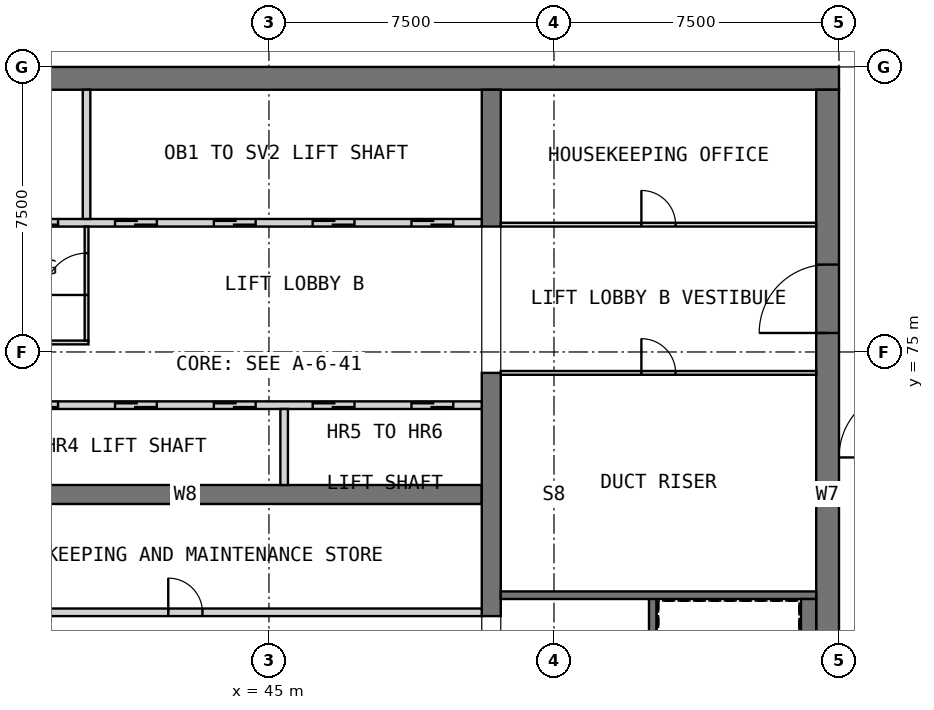
"""IFC4 building model, lengths in metres.
Left out: names, types, materials, properties, quantities, classifications, styles, units other than length and angle.
Written with IfcOpenShell. Run it as: python <this file> out.ifc"""

import sys

from ifc_helpers import new_model, si_unit, direction, frame, frame_2d, origin, place, context, subcontext, project, spatial, rectangle, extrude, element, fill, save


model = new_model("IFC4")
c1 = context("Model", 3, precision=1e-05, world=origin(), true_north=direction((0.0, 1.0)))
c2 = subcontext(c1, "Body", "Model", "MODEL_VIEW")
j1 = project(units=[si_unit("LENGTHUNIT", "METRE"), si_unit("PLANEANGLEUNIT", "RADIAN")], contexts=[c1])
p1 = place(None, origin())
s1 = spatial("IfcSite", under=j1, at=p1, CompositionType="ELEMENT")
p2 = place(p1, origin())
s2 = spatial("IfcBuilding", under=s1, at=p2, CompositionType="ELEMENT")
p3 = place(p2, frame((0.0, 0.0, 302.7)))
s3 = spatial("IfcBuildingStorey", under=s2, at=p3, CompositionType="ELEMENT", Elevation=302.7)
p4 = place(p3, frame((30.0, 82.2, 0.0), z_axis=(0.0, 0.0, 1.0), x_axis=(1.0, 0.0, 0.0)))
e1 = element("IfcWall", 1, at=p4, inside=s3, PredefinedType="SHEAR", context=c2, shape_type="SweptSolid", body=[
    extrude(rectangle(XDim=30.0, YDim=0.6, at=frame_2d((15.0, 0.0))), origin(), (0.0, 0.0, 1.0), 6.0),
])
p5 = place(p3, frame((59.7, 60.6, 0.0), z_axis=(0.0, 0.0, 1.0), x_axis=(0.0, 1.0, 0.0)))
e2 = element("IfcWall", 2, at=p5, inside=s3, PredefinedType="SHEAR", context=c2, shape_type="SweptSolid", body=[
    extrude(rectangle(XDim=21.3, YDim=0.6, at=frame_2d((10.65, 0.0))), origin(), (0.0, 0.0, 1.0), 6.0),
])
p6 = place(p5, frame((14.9, 0.0, 0.0)))
e3 = element("IfcOpeningElement", 3, at=p6, cuts=e2, PredefinedType="OPENING", context=c2, shape_type="SweptSolid", body=[
    extrude(rectangle(XDim=1.8, YDim=2.1, at=frame_2d((0.9, 1.05))), frame((0.0, 0.31, 0.0), z_axis=(0.0, -1.0, 0.0), x_axis=(1.0, 0.0, 0.0)), (0.0, 0.0, 1.0), 0.62),
])
p7 = place(p3, frame((35.0, 71.25, 0.0), z_axis=(0.0, 0.0, 1.0), x_axis=(1.0, 0.0, 0.0)))
e4 = element("IfcWall", 4, at=p7, inside=s3, PredefinedType="SHEAR", context=c2, shape_type="SweptSolid", body=[
    extrude(rectangle(XDim=15.6, YDim=0.5, at=frame_2d((7.8, 0.0))), origin(), (0.0, 0.0, 1.0), 6.0),
])
p8 = place(p3, frame((50.85, 68.05, 0.0), z_axis=(0.0, 0.0, 1.0), x_axis=(0.0, 1.0, 0.0)))
e5 = element("IfcWall", 5, at=p8, inside=s3, PredefinedType="SHEAR", context=c2, shape_type="SweptSolid", body=[
    extrude(rectangle(XDim=6.4, YDim=0.5, at=frame_2d((3.2, 0.0))), origin(), (0.0, 0.0, 1.0), 6.0),
])
p9 = place(p3, frame((50.85, 78.3, 0.0), z_axis=(0.0, 0.0, 1.0), x_axis=(0.0, 1.0, 0.0)))
e6 = element("IfcWall", 6, at=p9, inside=s3, PredefinedType="SHEAR", context=c2, shape_type="SweptSolid", body=[
    extrude(rectangle(XDim=3.6, YDim=0.5, at=frame_2d((1.8, 0.0))), origin(), (0.0, 0.0, 1.0), 6.0),
])
p10 = place(p3, frame((35.0, 68.15, 0.0), z_axis=(0.0, 0.0, 1.0), x_axis=(1.0, 0.0, 0.0)))
e7 = element("IfcWall", 7, at=p10, inside=s3, PredefinedType="PARTITIONING", context=c2, shape_type="SweptSolid", body=[
    extrude(rectangle(XDim=15.6, YDim=0.2, at=frame_2d((7.8, 0.0))), origin(), (0.0, 0.0, 1.0), 5.7),
])
p11 = place(p10, frame((7.35, 0.0, 0.0)))
e8 = element("IfcOpeningElement", 8, at=p11, cuts=e7, PredefinedType="OPENING", context=c2, shape_type="SweptSolid", body=[
    extrude(rectangle(XDim=0.9, YDim=2.1, at=frame_2d((0.45, 1.05))), frame((0.0, 0.11, 0.0), z_axis=(0.0, -1.0, 0.0), x_axis=(1.0, 0.0, 0.0)), (0.0, 0.0, 1.0), 0.22),
])
p12 = place(p3, frame((35.0, 73.6, 0.0), z_axis=(0.0, 0.0, 1.0), x_axis=(1.0, 0.0, 0.0)))
e9 = element("IfcWall", 9, at=p12, inside=s3, PredefinedType="SOLIDWALL", context=c2, shape_type="SweptSolid", body=[
    extrude(rectangle(XDim=15.6, YDim=0.2, at=frame_2d((7.8, 0.0))), origin(), (0.0, 0.0, 1.0), 6.0),
])
p13 = place(p12, frame((0.75, 0.0, 0.0)))
e10 = element("IfcOpeningElement", 10, at=p13, cuts=e9, PredefinedType="OPENING", context=c2, shape_type="SweptSolid", body=[
    extrude(rectangle(XDim=1.1, YDim=2.1, at=frame_2d((0.55, 1.05))), frame((0.0, 0.11, 0.0), z_axis=(0.0, -1.0, 0.0), x_axis=(1.0, 0.0, 0.0)), (0.0, 0.0, 1.0), 0.22),
])
p14 = place(p12, frame((3.35, 0.0, 0.0)))
e11 = element("IfcOpeningElement", 11, at=p14, cuts=e9, PredefinedType="OPENING", context=c2, shape_type="SweptSolid", body=[
    extrude(rectangle(XDim=1.1, YDim=2.1, at=frame_2d((0.55, 1.05))), frame((0.0, 0.11, 0.0), z_axis=(0.0, -1.0, 0.0), x_axis=(1.0, 0.0, 0.0)), (0.0, 0.0, 1.0), 0.22),
])
p15 = place(p12, frame((5.95, 0.0, 0.0)))
e12 = element("IfcOpeningElement", 12, at=p15, cuts=e9, PredefinedType="OPENING", context=c2, shape_type="SweptSolid", body=[
    extrude(rectangle(XDim=1.1, YDim=2.1, at=frame_2d((0.55, 1.05))), frame((0.0, 0.11, 0.0), z_axis=(0.0, -1.0, 0.0), x_axis=(1.0, 0.0, 0.0)), (0.0, 0.0, 1.0), 0.22),
])
p16 = place(p12, frame((8.55, 0.0, 0.0)))
e13 = element("IfcOpeningElement", 13, at=p16, cuts=e9, PredefinedType="OPENING", context=c2, shape_type="SweptSolid", body=[
    extrude(rectangle(XDim=1.1, YDim=2.1, at=frame_2d((0.55, 1.05))), frame((0.0, 0.11, 0.0), z_axis=(0.0, -1.0, 0.0), x_axis=(1.0, 0.0, 0.0)), (0.0, 0.0, 1.0), 0.22),
])
p17 = place(p12, frame((11.15, 0.0, 0.0)))
e14 = element("IfcOpeningElement", 14, at=p17, cuts=e9, PredefinedType="OPENING", context=c2, shape_type="SweptSolid", body=[
    extrude(rectangle(XDim=1.1, YDim=2.1, at=frame_2d((0.55, 1.05))), frame((0.0, 0.11, 0.0), z_axis=(0.0, -1.0, 0.0), x_axis=(1.0, 0.0, 0.0)), (0.0, 0.0, 1.0), 0.22),
])
p18 = place(p12, frame((13.75, 0.0, 0.0)))
e15 = element("IfcOpeningElement", 15, at=p18, cuts=e9, PredefinedType="OPENING", context=c2, shape_type="SweptSolid", body=[
    extrude(rectangle(XDim=1.1, YDim=2.1, at=frame_2d((0.55, 1.05))), frame((0.0, 0.11, 0.0), z_axis=(0.0, -1.0, 0.0), x_axis=(1.0, 0.0, 0.0)), (0.0, 0.0, 1.0), 0.22),
])
p19 = place(p3, frame((45.4, 71.5, 0.0), z_axis=(0.0, 0.0, 1.0), x_axis=(0.0, 1.0, 0.0)))
e16 = element("IfcWall", 16, at=p19, inside=s3, PredefinedType="SOLIDWALL", context=c2, shape_type="SweptSolid", body=[
    extrude(rectangle(XDim=2.0, YDim=0.2, at=frame_2d((1.0, 0.0))), origin(), (0.0, 0.0, 1.0), 6.0),
])
p20 = place(p3, frame((35.0, 78.4, 0.0), z_axis=(0.0, 0.0, 1.0), x_axis=(1.0, 0.0, 0.0)))
e17 = element("IfcWall", 17, at=p20, inside=s3, PredefinedType="SOLIDWALL", context=c2, shape_type="SweptSolid", body=[
    extrude(rectangle(XDim=15.6, YDim=0.2, at=frame_2d((7.8, 0.0))), origin(), (0.0, 0.0, 1.0), 6.0),
])
p21 = place(p20, frame((0.75, 0.0, 0.0)))
e18 = element("IfcOpeningElement", 18, at=p21, cuts=e17, PredefinedType="OPENING", context=c2, shape_type="SweptSolid", body=[
    extrude(rectangle(XDim=1.1, YDim=2.1, at=frame_2d((0.55, 1.05))), frame((0.0, 0.11, 0.0), z_axis=(0.0, -1.0, 0.0), x_axis=(1.0, 0.0, 0.0)), (0.0, 0.0, 1.0), 0.22),
])
p22 = place(p20, frame((3.35, 0.0, 0.0)))
e19 = element("IfcOpeningElement", 19, at=p22, cuts=e17, PredefinedType="OPENING", context=c2, shape_type="SweptSolid", body=[
    extrude(rectangle(XDim=1.1, YDim=2.1, at=frame_2d((0.55, 1.05))), frame((0.0, 0.11, 0.0), z_axis=(0.0, -1.0, 0.0), x_axis=(1.0, 0.0, 0.0)), (0.0, 0.0, 1.0), 0.22),
])
p23 = place(p20, frame((5.95, 0.0, 0.0)))
e20 = element("IfcOpeningElement", 20, at=p23, cuts=e17, PredefinedType="OPENING", context=c2, shape_type="SweptSolid", body=[
    extrude(rectangle(XDim=1.1, YDim=2.1, at=frame_2d((0.55, 1.05))), frame((0.0, 0.11, 0.0), z_axis=(0.0, -1.0, 0.0), x_axis=(1.0, 0.0, 0.0)), (0.0, 0.0, 1.0), 0.22),
])
p24 = place(p20, frame((8.55, 0.0, 0.0)))
e21 = element("IfcOpeningElement", 21, at=p24, cuts=e17, PredefinedType="OPENING", context=c2, shape_type="SweptSolid", body=[
    extrude(rectangle(XDim=1.1, YDim=2.1, at=frame_2d((0.55, 1.05))), frame((0.0, 0.11, 0.0), z_axis=(0.0, -1.0, 0.0), x_axis=(1.0, 0.0, 0.0)), (0.0, 0.0, 1.0), 0.22),
])
p25 = place(p20, frame((11.15, 0.0, 0.0)))
e22 = element("IfcOpeningElement", 22, at=p25, cuts=e17, PredefinedType="OPENING", context=c2, shape_type="SweptSolid", body=[
    extrude(rectangle(XDim=1.1, YDim=2.1, at=frame_2d((0.55, 1.05))), frame((0.0, 0.11, 0.0), z_axis=(0.0, -1.0, 0.0), x_axis=(1.0, 0.0, 0.0)), (0.0, 0.0, 1.0), 0.22),
])
p26 = place(p20, frame((13.75, 0.0, 0.0)))
e23 = element("IfcOpeningElement", 23, at=p26, cuts=e17, PredefinedType="OPENING", context=c2, shape_type="SweptSolid", body=[
    extrude(rectangle(XDim=1.1, YDim=2.1, at=frame_2d((0.55, 1.05))), frame((0.0, 0.11, 0.0), z_axis=(0.0, -1.0, 0.0), x_axis=(1.0, 0.0, 0.0)), (0.0, 0.0, 1.0), 0.22),
])
p27 = place(p3, frame((40.2, 78.5, 0.0), z_axis=(0.0, 0.0, 1.0), x_axis=(0.0, 1.0, 0.0)))
e24 = element("IfcWall", 24, at=p27, inside=s3, PredefinedType="SOLIDWALL", context=c2, shape_type="SweptSolid", body=[
    extrude(rectangle(XDim=3.4, YDim=0.2, at=frame_2d((1.7, 0.0))), origin(), (0.0, 0.0, 1.0), 6.0),
])
p28 = place(p3, frame((35.0, 75.25, 0.0), z_axis=(0.0, 0.0, 1.0), x_axis=(1.0, 0.0, 0.0)))
e25 = element("IfcWall", 25, at=p28, inside=s3, PredefinedType="PARTITIONING", context=c2, shape_type="SweptSolid", body=[
    extrude(rectangle(XDim=5.25, YDim=0.1, at=frame_2d((2.625, 0.0))), origin(), (0.0, 0.0, 1.0), 5.7),
])
p29 = place(p3, frame((40.2, 75.3, 0.0), z_axis=(0.0, 0.0, 1.0), x_axis=(0.0, 1.0, 0.0)))
e26 = element("IfcWall", 26, at=p29, inside=s3, PredefinedType="PARTITIONING", context=c2, shape_type="SweptSolid", body=[
    extrude(rectangle(XDim=3.0, YDim=0.1, at=frame_2d((1.5, 0.0))), origin(), (0.0, 0.0, 1.0), 5.7),
])
p30 = place(p29, frame((1.2, 0.0, 0.0)))
e27 = element("IfcOpeningElement", 27, at=p30, cuts=e26, PredefinedType="OPENING", context=c2, shape_type="SweptSolid", body=[
    extrude(rectangle(XDim=1.1, YDim=2.1, at=frame_2d((0.55, 1.05))), frame((0.0, 0.06, 0.0), z_axis=(0.0, -1.0, 0.0), x_axis=(1.0, 0.0, 0.0)), (0.0, 0.0, 1.0), 0.12),
])
p31 = place(p3, frame((55.1, 60.6, 0.0), z_axis=(0.0, 0.0, 1.0), x_axis=(0.0, 1.0, 0.0)))
e28 = element("IfcWall", 28, at=p31, inside=s3, PredefinedType="SOLIDWALL", context=c2, shape_type="SweptSolid", body=[
    extrude(rectangle(XDim=8.0, YDim=0.2, at=frame_2d((4.0, 0.0))), origin(), (0.0, 0.0, 1.0), 5.7),
])
p32 = place(p3, frame((51.1, 68.6, 0.0), z_axis=(0.0, 0.0, 1.0), x_axis=(1.0, 0.0, 0.0)))
e29 = element("IfcWall", 29, at=p32, inside=s3, PredefinedType="SOLIDWALL", context=c2, shape_type="SweptSolid", body=[
    extrude(rectangle(XDim=8.3, YDim=0.2, at=frame_2d((4.15, 0.0))), origin(), (0.0, 0.0, 1.0), 5.7),
])
p33 = place(p3, frame((59.2, 60.6, 0.0), z_axis=(0.0, 0.0, 1.0), x_axis=(0.0, 1.0, 0.0)))
e30 = element("IfcWall", 30, at=p33, inside=s3, PredefinedType="SOLIDWALL", context=c2, shape_type="SweptSolid", body=[
    extrude(rectangle(XDim=7.9, YDim=0.4, at=frame_2d((3.95, 0.0))), origin(), (0.0, 0.0, 1.0), 5.7),
])
p34 = place(p3, frame((51.1, 74.45, 0.0), z_axis=(0.0, 0.0, 1.0), x_axis=(1.0, 0.0, 0.0)))
e31 = element("IfcWall", 31, at=p34, inside=s3, PredefinedType="PARTITIONING", context=c2, shape_type="SweptSolid", body=[
    extrude(rectangle(XDim=8.3, YDim=0.1, at=frame_2d((4.15, 0.0))), origin(), (0.0, 0.0, 1.0), 5.7),
])
p35 = place(p34, frame((3.7, 0.0, 0.0)))
e32 = element("IfcOpeningElement", 32, at=p35, cuts=e31, PredefinedType="OPENING", context=c2, shape_type="SweptSolid", body=[
    extrude(rectangle(XDim=0.9, YDim=2.1, at=frame_2d((0.45, 1.05))), frame((0.0, 0.06, 0.0), z_axis=(0.0, -1.0, 0.0), x_axis=(1.0, 0.0, 0.0)), (0.0, 0.0, 1.0), 0.12),
])
p36 = place(p3, frame((51.1, 78.35, 0.0), z_axis=(0.0, 0.0, 1.0), x_axis=(1.0, 0.0, 0.0)))
e33 = element("IfcWall", 33, at=p36, inside=s3, PredefinedType="PARTITIONING", context=c2, shape_type="SweptSolid", body=[
    extrude(rectangle(XDim=8.3, YDim=0.1, at=frame_2d((4.15, 0.0))), origin(), (0.0, 0.0, 1.0), 5.7),
])
p37 = place(p36, frame((3.7, 0.0, 0.0)))
e34 = element("IfcOpeningElement", 34, at=p37, cuts=e33, PredefinedType="OPENING", context=c2, shape_type="SweptSolid", body=[
    extrude(rectangle(XDim=0.9, YDim=2.1, at=frame_2d((0.45, 1.05))), frame((0.0, 0.06, 0.0), z_axis=(0.0, -1.0, 0.0), x_axis=(1.0, 0.0, 0.0)), (0.0, 0.0, 1.0), 0.12),
])
p38 = place(p11, origin())
e35 = element("IfcDoor", 35, at=p38, inside=s3, OperationType="SINGLE_SWING_LEFT", PredefinedType="DOOR", context=c2, shape_type="SweptSolid", body=[
    extrude(rectangle(XDim=0.9, YDim=2.1, at=frame_2d((0.45, 1.05))), frame((0.0, 0.025, 0.0), z_axis=(0.0, -1.0, 0.0), x_axis=(1.0, 0.0, 0.0)), (0.0, 0.0, 1.0), 0.05),
])
fill(e8, e35)
p39 = place(p14, origin())
e36 = element("IfcDoor", 36, at=p39, inside=s3, OperationType="DOUBLE_DOOR_SLIDING", PredefinedType="DOOR", context=c2, shape_type="SweptSolid", body=[
    extrude(rectangle(XDim=1.1, YDim=2.1, at=frame_2d((0.55, 1.05))), frame((0.0, 0.025, 0.0), z_axis=(0.0, -1.0, 0.0), x_axis=(1.0, 0.0, 0.0)), (0.0, 0.0, 1.0), 0.05),
])
fill(e11, e36)
p40 = place(p15, origin())
e37 = element("IfcDoor", 37, at=p40, inside=s3, OperationType="DOUBLE_DOOR_SLIDING", PredefinedType="DOOR", context=c2, shape_type="SweptSolid", body=[
    extrude(rectangle(XDim=1.1, YDim=2.1, at=frame_2d((0.55, 1.05))), frame((0.0, 0.025, 0.0), z_axis=(0.0, -1.0, 0.0), x_axis=(1.0, 0.0, 0.0)), (0.0, 0.0, 1.0), 0.05),
])
fill(e12, e37)
p41 = place(p16, origin())
e38 = element("IfcDoor", 38, at=p41, inside=s3, OperationType="DOUBLE_DOOR_SLIDING", PredefinedType="DOOR", context=c2, shape_type="SweptSolid", body=[
    extrude(rectangle(XDim=1.1, YDim=2.1, at=frame_2d((0.55, 1.05))), frame((0.0, 0.025, 0.0), z_axis=(0.0, -1.0, 0.0), x_axis=(1.0, 0.0, 0.0)), (0.0, 0.0, 1.0), 0.05),
])
fill(e13, e38)
p42 = place(p17, origin())
e39 = element("IfcDoor", 39, at=p42, inside=s3, OperationType="DOUBLE_DOOR_SLIDING", PredefinedType="DOOR", context=c2, shape_type="SweptSolid", body=[
    extrude(rectangle(XDim=1.1, YDim=2.1, at=frame_2d((0.55, 1.05))), frame((0.0, 0.025, 0.0), z_axis=(0.0, -1.0, 0.0), x_axis=(1.0, 0.0, 0.0)), (0.0, 0.0, 1.0), 0.05),
])
fill(e14, e39)
p43 = place(p18, origin())
e40 = element("IfcDoor", 40, at=p43, inside=s3, OperationType="DOUBLE_DOOR_SLIDING", PredefinedType="DOOR", context=c2, shape_type="SweptSolid", body=[
    extrude(rectangle(XDim=1.1, YDim=2.1, at=frame_2d((0.55, 1.05))), frame((0.0, 0.025, 0.0), z_axis=(0.0, -1.0, 0.0), x_axis=(1.0, 0.0, 0.0)), (0.0, 0.0, 1.0), 0.05),
])
fill(e15, e40)
p44 = place(p22, origin())
e41 = element("IfcDoor", 41, at=p44, inside=s3, OperationType="DOUBLE_DOOR_SLIDING", PredefinedType="DOOR", context=c2, shape_type="SweptSolid", body=[
    extrude(rectangle(XDim=1.1, YDim=2.1, at=frame_2d((0.55, 1.05))), frame((0.0, 0.025, 0.0), z_axis=(0.0, -1.0, 0.0), x_axis=(1.0, 0.0, 0.0)), (0.0, 0.0, 1.0), 0.05),
])
fill(e19, e41)
p45 = place(p23, origin())
e42 = element("IfcDoor", 42, at=p45, inside=s3, OperationType="DOUBLE_DOOR_SLIDING", PredefinedType="DOOR", context=c2, shape_type="SweptSolid", body=[
    extrude(rectangle(XDim=1.1, YDim=2.1, at=frame_2d((0.55, 1.05))), frame((0.0, 0.025, 0.0), z_axis=(0.0, -1.0, 0.0), x_axis=(1.0, 0.0, 0.0)), (0.0, 0.0, 1.0), 0.05),
])
fill(e20, e42)
p46 = place(p24, origin())
e43 = element("IfcDoor", 43, at=p46, inside=s3, OperationType="DOUBLE_DOOR_SLIDING", PredefinedType="DOOR", context=c2, shape_type="SweptSolid", body=[
    extrude(rectangle(XDim=1.1, YDim=2.1, at=frame_2d((0.55, 1.05))), frame((0.0, 0.025, 0.0), z_axis=(0.0, -1.0, 0.0), x_axis=(1.0, 0.0, 0.0)), (0.0, 0.0, 1.0), 0.05),
])
fill(e21, e43)
p47 = place(p25, origin())
e44 = element("IfcDoor", 44, at=p47, inside=s3, OperationType="DOUBLE_DOOR_SLIDING", PredefinedType="DOOR", context=c2, shape_type="SweptSolid", body=[
    extrude(rectangle(XDim=1.1, YDim=2.1, at=frame_2d((0.55, 1.05))), frame((0.0, 0.025, 0.0), z_axis=(0.0, -1.0, 0.0), x_axis=(1.0, 0.0, 0.0)), (0.0, 0.0, 1.0), 0.05),
])
fill(e22, e44)
p48 = place(p26, origin())
e45 = element("IfcDoor", 45, at=p48, inside=s3, OperationType="DOUBLE_DOOR_SLIDING", PredefinedType="DOOR", context=c2, shape_type="SweptSolid", body=[
    extrude(rectangle(XDim=1.1, YDim=2.1, at=frame_2d((0.55, 1.05))), frame((0.0, 0.025, 0.0), z_axis=(0.0, -1.0, 0.0), x_axis=(1.0, 0.0, 0.0)), (0.0, 0.0, 1.0), 0.05),
])
fill(e23, e45)
p49 = place(p6, origin())
e46 = element("IfcDoor", 46, at=p49, inside=s3, OperationType="DOUBLE_DOOR_SINGLE_SWING", PredefinedType="DOOR", context=c2, shape_type="SweptSolid", body=[
    extrude(rectangle(XDim=1.8, YDim=2.1, at=frame_2d((0.9, 1.05))), frame((0.0, 0.025, 0.0), z_axis=(0.0, -1.0, 0.0), x_axis=(1.0, 0.0, 0.0)), (0.0, 0.0, 1.0), 0.05),
])
fill(e3, e46)
p50 = place(p30, origin())
e47 = element("IfcDoor", 47, at=p50, inside=s3, OperationType="SINGLE_SWING_LEFT", PredefinedType="DOOR", context=c2, shape_type="SweptSolid", body=[
    extrude(rectangle(XDim=1.1, YDim=2.1, at=frame_2d((0.55, 1.05))), frame((0.0, 0.025, 0.0), z_axis=(0.0, -1.0, 0.0), x_axis=(1.0, 0.0, 0.0)), (0.0, 0.0, 1.0), 0.05),
])
fill(e27, e47)
p51 = place(p35, origin())
e48 = element("IfcDoor", 48, at=p51, inside=s3, OperationType="SINGLE_SWING_LEFT", PredefinedType="DOOR", context=c2, shape_type="SweptSolid", body=[
    extrude(rectangle(XDim=0.9, YDim=2.1, at=frame_2d((0.45, 1.05))), frame((0.0, 0.025, 0.0), z_axis=(0.0, -1.0, 0.0), x_axis=(1.0, 0.0, 0.0)), (0.0, 0.0, 1.0), 0.05),
])
fill(e32, e48)
p52 = place(p37, origin())
e49 = element("IfcDoor", 49, at=p52, inside=s3, OperationType="SINGLE_SWING_LEFT", PredefinedType="DOOR", context=c2, shape_type="SweptSolid", body=[
    extrude(rectangle(XDim=0.9, YDim=2.1, at=frame_2d((0.45, 1.05))), frame((0.0, 0.025, 0.0), z_axis=(0.0, -1.0, 0.0), x_axis=(1.0, 0.0, 0.0)), (0.0, 0.0, 1.0), 0.05),
])
fill(e34, e49)
save(model, sys.argv[1])
